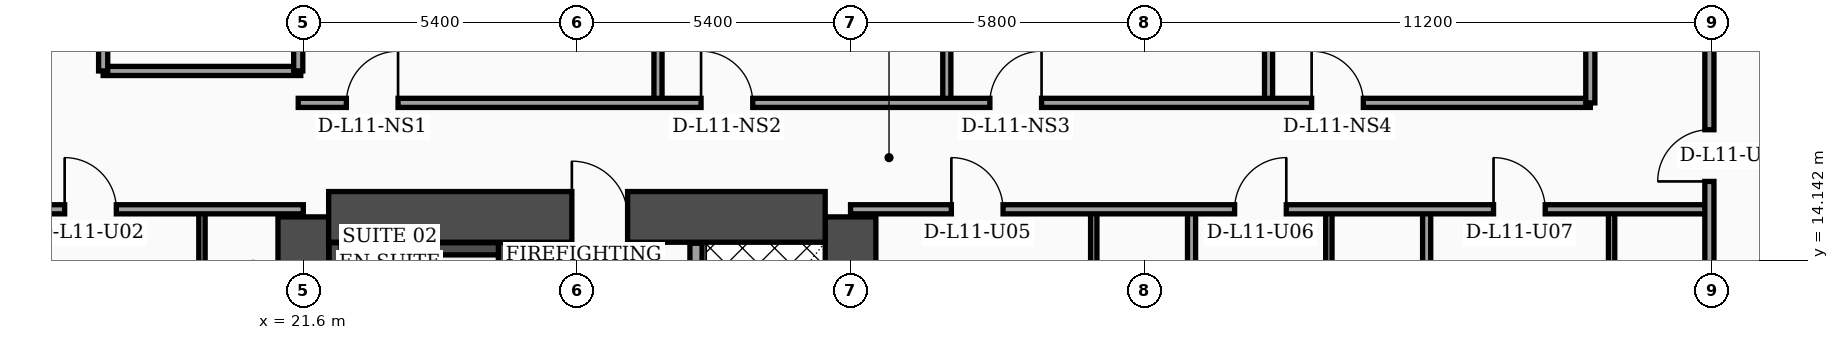
"""IFC4 building model, lengths in metres.
Left out: names, types, materials, properties, quantities, classifications, styles, units other than length and angle.
Written with IfcOpenShell. Run it as: python <this file> out.ifc"""

import sys

from ifc_helpers import new_model, si_unit, direction, frame, frame_2d, origin, place, context, subcontext, project, spatial, rectangle, extrude, element, fill, save


model = new_model("IFC4")
c1 = context("Model", 3, precision=1e-05, world=origin(), true_north=direction((0.0, 1.0)))
c2 = subcontext(c1, "Body", "Model", "MODEL_VIEW")
j1 = project(units=[si_unit("LENGTHUNIT", "METRE"), si_unit("PLANEANGLEUNIT", "RADIAN")], contexts=[c1])
p1 = place(None, origin())
s1 = spatial("IfcSite", under=j1, at=p1, CompositionType="ELEMENT")
p2 = place(p1, origin())
s2 = spatial("IfcBuilding", under=s1, at=p2, CompositionType="ELEMENT")
p3 = place(p2, frame((0.0, 0.0, 50.8)))
s3 = spatial("IfcBuildingStorey", under=s2, at=p3, CompositionType="ELEMENT", Elevation=50.8)
for number, where, z_axis, x_axis in (
    (1, (21.6, 4.6, 0.0), (0.0, 0.0, 1.0), (0.0, 1.0, 0.0)),
    (2, (32.4, 4.6, 0.0), (0.0, 0.0, 1.0), (0.0, 1.0, 0.0)),
):
    element("IfcWall", number, at=place(p3, frame(where, z_axis=z_axis, x_axis=x_axis)), inside=s3, PredefinedType="SHEAR", context=c2, shape_type="SweptSolid", body=[
        extrude(rectangle(XDim=10.4, YDim=1.0, at=frame_2d((5.2, 0.0))), origin(), (0.0, 0.0, 1.0), 3.56),
    ])
p4 = place(p3, frame((22.1, 15.0, 0.0), z_axis=(0.0, 0.0, 1.0), x_axis=(1.0, 0.0, 0.0)))
e3 = element("IfcWall", 3, at=p4, inside=s3, PredefinedType="SHEAR", context=c2, shape_type="SweptSolid", body=[
    extrude(rectangle(XDim=9.8, YDim=1.0, at=frame_2d((4.9, 0.0))), origin(), (0.0, 0.0, 1.0), 3.56),
])
p5 = place(p4, frame((4.8, 0.0, 0.0)))
e4 = element("IfcOpeningElement", 4, at=p5, cuts=e3, PredefinedType="OPENING", context=c2, shape_type="SweptSolid", body=[
    extrude(rectangle(XDim=1.1, YDim=2.2, at=frame_2d((0.55, 1.1))), frame((0.0, 0.51, 0.0), z_axis=(0.0, -1.0, 0.0), x_axis=(1.0, 0.0, 0.0)), (0.0, 0.0, 1.0), 1.02),
])
p6 = place(p3, frame((22.23, 5.1, 0.0), z_axis=(0.0, 0.0, 1.0), x_axis=(0.0, 1.0, 0.0)))
e5 = element("IfcWall", 5, at=p6, inside=s3, PredefinedType="SOLIDWALL", context=c2, shape_type="SweptSolid", body=[
    extrude(rectangle(XDim=9.39, YDim=0.24, at=frame_2d((4.695, 0.0))), origin(), (0.0, 0.0, 1.0), 3.56),
])
p7 = place(p3, frame((25.57, 5.1, 0.0), z_axis=(0.0, 0.0, 1.0), x_axis=(0.0, 1.0, 0.0)))
e6 = element("IfcWall", 6, at=p7, inside=s3, PredefinedType="SOLIDWALL", context=c2, shape_type="SweptSolid", body=[
    extrude(rectangle(XDim=9.39, YDim=0.24, at=frame_2d((4.695, 0.0))), origin(), (0.0, 0.0, 1.0), 3.56),
])
p8 = place(p7, frame((0.35, 0.0, 0.0)))
e7 = element("IfcOpeningElement", 7, at=p8, cuts=e6, PredefinedType="OPENING", context=c2, shape_type="SweptSolid", body=[
    extrude(rectangle(XDim=1.15, YDim=2.2, at=frame_2d((0.575, 1.1))), frame((0.0, 0.13, 0.0), z_axis=(0.0, -1.0, 0.0), x_axis=(1.0, 0.0, 0.0)), (0.0, 0.0, 1.0), 0.26),
])
p9 = place(p3, frame((22.35, 14.37, 0.0), z_axis=(0.0, 0.0, 1.0), x_axis=(1.0, 0.0, 0.0)))
e8 = element("IfcWall", 8, at=p9, inside=s3, PredefinedType="SOLIDWALL", context=c2, shape_type="SweptSolid", body=[
    extrude(rectangle(XDim=3.1, YDim=0.24, at=frame_2d((1.55, 0.0))), origin(), (0.0, 0.0, 1.0), 3.56),
])
p10 = place(p3, frame((29.35, 5.12, 0.0), z_axis=(0.0, 0.0, 1.0), x_axis=(0.0, 1.0, 0.0)))
e9 = element("IfcWall", 9, at=p10, inside=s3, PredefinedType="SOLIDWALL", context=c2, shape_type="SweptSolid", body=[
    extrude(rectangle(XDim=9.36, YDim=0.24, at=frame_2d((4.68, 0.0))), origin(), (0.0, 0.0, 1.0), 3.56),
])
p11 = place(p10, frame((0.55, 0.0, 0.0)))
e10 = element("IfcOpeningElement", 10, at=p11, cuts=e9, PredefinedType="OPENING", context=c2, shape_type="SweptSolid", body=[
    extrude(rectangle(XDim=1.3, YDim=2.35, at=frame_2d((0.65, 1.175))), frame((0.0, 0.13, 0.0), z_axis=(0.0, -1.0, 0.0), x_axis=(1.0, 0.0, 0.0)), (0.0, 0.0, 1.0), 0.26),
])
p12 = place(p3, frame((19.6, 2.44, 0.0), z_axis=(0.0, 0.0, 1.0), x_axis=(0.0, 1.0, 0.0)))
e11 = element("IfcWall", 11, at=p12, inside=s3, PredefinedType="PARTITIONING", context=c2, shape_type="SweptSolid", body=[
    extrude(rectangle(XDim=12.71, YDim=0.125, at=frame_2d((6.355, 0.0))), origin(), (0.0, 0.0, 1.0), 2.34),
])
p13 = place(p12, frame((4.34, 0.0, 0.0)))
e12 = element("IfcOpeningElement", 12, at=p13, cuts=e11, PredefinedType="OPENING", context=c2, shape_type="SweptSolid", body=[
    extrude(rectangle(XDim=0.96, YDim=2.2, at=frame_2d((0.48, 1.1))), frame((0.0, 0.073, 0.0), z_axis=(0.0, -1.0, 0.0), x_axis=(1.0, 0.0, 0.0)), (0.0, 0.0, 1.0), 0.145),
])
p14 = place(p12, frame((10.18, 0.0, 0.0)))
e13 = element("IfcOpeningElement", 13, at=p14, cuts=e11, PredefinedType="OPENING", context=c2, shape_type="SweptSolid", body=[
    extrude(rectangle(XDim=0.9, YDim=2.15, at=frame_2d((0.45, 1.075))), frame((0.0, 0.073, 0.0), z_axis=(0.0, -1.0, 0.0), x_axis=(1.0, 0.0, 0.0)), (0.0, 0.0, 1.0), 0.145),
])
p15 = place(p3, frame((15.15, 15.15, 0.0), z_axis=(0.0, 0.0, 1.0), x_axis=(1.0, 0.0, 0.0)))
e14 = element("IfcWall", 14, at=p15, inside=s3, PredefinedType="PARTITIONING", context=c2, shape_type="SweptSolid", body=[
    extrude(rectangle(XDim=6.45, YDim=0.18, at=frame_2d((3.225, 0.0))), origin(), (0.0, 0.0, 1.0), 2.34),
])
p16 = place(p15, frame((1.74, 0.0, 0.0)))
e15 = element("IfcOpeningElement", 15, at=p16, cuts=e14, PredefinedType="OPENING", context=c2, shape_type="SweptSolid", body=[
    extrude(rectangle(XDim=1.02, YDim=2.2, at=frame_2d((0.51, 1.1))), frame((0.0, 0.1, 0.0), z_axis=(0.0, -1.0, 0.0), x_axis=(1.0, 0.0, 0.0)), (0.0, 0.0, 1.0), 0.2),
])
p17 = place(p3, frame((17.65, 17.88, 0.0), z_axis=(0.0, 0.0, 1.0), x_axis=(1.0, 0.0, 0.0)))
e16 = element("IfcWall", 16, at=p17, inside=s3, PredefinedType="PARTITIONING", context=c2, shape_type="SweptSolid", body=[
    extrude(rectangle(XDim=3.9, YDim=0.18, at=frame_2d((1.95, 0.0))), origin(), (0.0, 0.0, 1.0), 3.56),
])
p18 = place(p3, frame((21.5, 17.88, 0.0), z_axis=(0.0, 0.0, 1.0), x_axis=(0.0, 1.0, 0.0)))
e17 = element("IfcWall", 17, at=p18, inside=s3, PredefinedType="PARTITIONING", context=c2, shape_type="SweptSolid", body=[
    extrude(rectangle(XDim=6.44, YDim=0.18, at=frame_2d((3.22, 0.0))), origin(), (0.0, 0.0, 1.0), 3.56),
])
p19 = place(p3, frame((17.65, 17.88, 0.0), z_axis=(0.0, 0.0, 1.0), x_axis=(0.0, 1.0, 0.0)))
e18 = element("IfcWall", 18, at=p19, inside=s3, PredefinedType="PARTITIONING", context=c2, shape_type="SweptSolid", body=[
    extrude(rectangle(XDim=6.44, YDim=0.18, at=frame_2d((3.22, 0.0))), origin(), (0.0, 0.0, 1.0), 3.56),
])
p20 = place(p19, frame((0.65, 0.0, 0.0)))
e19 = element("IfcOpeningElement", 19, at=p20, cuts=e18, PredefinedType="OPENING", context=c2, shape_type="SweptSolid", body=[
    extrude(rectangle(XDim=0.98, YDim=2.15, at=frame_2d((0.49, 1.075))), frame((0.0, 0.1, 0.0), z_axis=(0.0, -1.0, 0.0), x_axis=(1.0, 0.0, 0.0)), (0.0, 0.0, 1.0), 0.2),
])
p21 = place(p19, frame((3.97, 0.0, 0.0)))
e20 = element("IfcOpeningElement", 20, at=p21, cuts=e18, PredefinedType="OPENING", context=c2, shape_type="SweptSolid", body=[
    extrude(rectangle(XDim=0.96, YDim=2.2, at=frame_2d((0.48, 1.1))), frame((0.0, 0.1, 0.0), z_axis=(0.0, -1.0, 0.0), x_axis=(1.0, 0.0, 0.0)), (0.0, 0.0, 1.0), 0.2),
])
p22 = place(p3, frame((37.2, 2.44, 0.0), z_axis=(0.0, 0.0, 1.0), x_axis=(0.0, 1.0, 0.0)))
e21 = element("IfcWall", 21, at=p22, inside=s3, PredefinedType="PARTITIONING", context=c2, shape_type="SweptSolid", body=[
    extrude(rectangle(XDim=12.71, YDim=0.125, at=frame_2d((6.355, 0.0))), origin(), (0.0, 0.0, 1.0), 2.84),
])
p23 = place(p22, frame((4.35, 0.0, 0.0)))
e22 = element("IfcOpeningElement", 22, at=p23, cuts=e21, PredefinedType="OPENING", context=c2, shape_type="SweptSolid", body=[
    extrude(rectangle(XDim=0.96, YDim=2.2, at=frame_2d((0.48, 1.1))), frame((0.0, 0.073, 0.0), z_axis=(0.0, -1.0, 0.0), x_axis=(1.0, 0.0, 0.0)), (0.0, 0.0, 1.0), 0.145),
])
p24 = place(p22, frame((10.21, 0.0, 0.0)))
e23 = element("IfcOpeningElement", 23, at=p24, cuts=e21, PredefinedType="OPENING", context=c2, shape_type="SweptSolid", body=[
    extrude(rectangle(XDim=0.9, YDim=2.15, at=frame_2d((0.45, 1.075))), frame((0.0, 0.073, 0.0), z_axis=(0.0, -1.0, 0.0), x_axis=(1.0, 0.0, 0.0)), (0.0, 0.0, 1.0), 0.145),
])
p25 = place(p3, frame((41.84, 2.44, 0.0), z_axis=(0.0, 0.0, 1.0), x_axis=(0.0, 1.0, 0.0)))
e24 = element("IfcWall", 24, at=p25, inside=s3, PredefinedType="PARTITIONING", context=c2, shape_type="SweptSolid", body=[
    extrude(rectangle(XDim=12.71, YDim=0.125, at=frame_2d((6.355, 0.0))), origin(), (0.0, 0.0, 1.0), 3.04),
])
p26 = place(p25, frame((4.35, 0.0, 0.0)))
e25 = element("IfcOpeningElement", 25, at=p26, cuts=e24, PredefinedType="OPENING", context=c2, shape_type="SweptSolid", body=[
    extrude(rectangle(XDim=0.96, YDim=2.2, at=frame_2d((0.48, 1.1))), frame((0.0, 0.073, 0.0), z_axis=(0.0, -1.0, 0.0), x_axis=(1.0, 0.0, 0.0)), (0.0, 0.0, 1.0), 0.145),
])
p27 = place(p25, frame((10.21, 0.0, 0.0)))
e26 = element("IfcOpeningElement", 26, at=p27, cuts=e24, PredefinedType="OPENING", context=c2, shape_type="SweptSolid", body=[
    extrude(rectangle(XDim=0.9, YDim=2.15, at=frame_2d((0.45, 1.075))), frame((0.0, 0.073, 0.0), z_axis=(0.0, -1.0, 0.0), x_axis=(1.0, 0.0, 0.0)), (0.0, 0.0, 1.0), 0.145),
])
p28 = place(p3, frame((39.13, 2.44, 0.0), z_axis=(0.0, 0.0, 1.0), x_axis=(0.0, 1.0, 0.0)))
e27 = element("IfcWall", 27, at=p28, inside=s3, PredefinedType="PARTITIONING", context=c2, shape_type="SweptSolid", body=[
    extrude(rectangle(XDim=12.71, YDim=0.16, at=frame_2d((6.355, 0.0))), origin(), (0.0, 0.0, 1.0), 2.84),
])
p29 = place(p3, frame((47.42, 2.44, 0.0), z_axis=(0.0, 0.0, 1.0), x_axis=(0.0, 1.0, 0.0)))
e28 = element("IfcWall", 28, at=p29, inside=s3, PredefinedType="PARTITIONING", context=c2, shape_type="SweptSolid", body=[
    extrude(rectangle(XDim=12.71, YDim=0.125, at=frame_2d((6.355, 0.0))), origin(), (0.0, 0.0, 1.0), 2.84),
])
p30 = place(p29, frame((4.35, 0.0, 0.0)))
e29 = element("IfcOpeningElement", 29, at=p30, cuts=e28, PredefinedType="OPENING", context=c2, shape_type="SweptSolid", body=[
    extrude(rectangle(XDim=0.96, YDim=2.2, at=frame_2d((0.48, 1.1))), frame((0.0, 0.073, 0.0), z_axis=(0.0, -1.0, 0.0), x_axis=(1.0, 0.0, 0.0)), (0.0, 0.0, 1.0), 0.145),
])
p31 = place(p29, frame((10.21, 0.0, 0.0)))
e30 = element("IfcOpeningElement", 30, at=p31, cuts=e28, PredefinedType="OPENING", context=c2, shape_type="SweptSolid", body=[
    extrude(rectangle(XDim=0.9, YDim=2.15, at=frame_2d((0.45, 1.075))), frame((0.0, 0.073, 0.0), z_axis=(0.0, -1.0, 0.0), x_axis=(1.0, 0.0, 0.0)), (0.0, 0.0, 1.0), 0.145),
])
p32 = place(p3, frame((43.77, 2.44, 0.0), z_axis=(0.0, 0.0, 1.0), x_axis=(0.0, 1.0, 0.0)))
e31 = element("IfcWall", 31, at=p32, inside=s3, PredefinedType="PARTITIONING", context=c2, shape_type="SweptSolid", body=[
    extrude(rectangle(XDim=12.71, YDim=0.16, at=frame_2d((6.355, 0.0))), origin(), (0.0, 0.0, 1.0), 3.04),
])
p33 = place(p3, frame((32.4, 15.15, 0.0), z_axis=(0.0, 0.0, 1.0), x_axis=(1.0, 0.0, 0.0)))
e32 = element("IfcWall", 32, at=p33, inside=s3, PredefinedType="PARTITIONING", context=c2, shape_type="SweptSolid", body=[
    extrude(rectangle(XDim=16.95, YDim=0.18, at=frame_2d((8.475, 0.0))), origin(), (0.0, 0.0, 1.0), 2.84),
])
p34 = place(p33, frame((1.99, 0.0, 0.0)))
e33 = element("IfcOpeningElement", 33, at=p34, cuts=e32, PredefinedType="OPENING", context=c2, shape_type="SweptSolid", body=[
    extrude(rectangle(XDim=1.02, YDim=2.2, at=frame_2d((0.51, 1.1))), frame((0.0, 0.1, 0.0), z_axis=(0.0, -1.0, 0.0), x_axis=(1.0, 0.0, 0.0)), (0.0, 0.0, 1.0), 0.2),
])
p35 = place(p33, frame((7.58, 0.0, 0.0)))
e34 = element("IfcOpeningElement", 34, at=p35, cuts=e32, PredefinedType="OPENING", context=c2, shape_type="SweptSolid", body=[
    extrude(rectangle(XDim=1.02, YDim=2.2, at=frame_2d((0.51, 1.1))), frame((0.0, 0.1, 0.0), z_axis=(0.0, -1.0, 0.0), x_axis=(1.0, 0.0, 0.0)), (0.0, 0.0, 1.0), 0.2),
])
p36 = place(p33, frame((12.69, 0.0, 0.0)))
e35 = element("IfcOpeningElement", 35, at=p36, cuts=e32, PredefinedType="OPENING", context=c2, shape_type="SweptSolid", body=[
    extrude(rectangle(XDim=1.02, YDim=2.2, at=frame_2d((0.51, 1.1))), frame((0.0, 0.1, 0.0), z_axis=(0.0, -1.0, 0.0), x_axis=(1.0, 0.0, 0.0)), (0.0, 0.0, 1.0), 0.2),
])
p37 = place(p3, frame((28.6, 17.25, 0.0), z_axis=(0.0, 0.0, 1.0), x_axis=(0.0, 1.0, 0.0)))
e36 = element("IfcWall", 36, at=p37, inside=s3, PredefinedType="PARTITIONING", context=c2, shape_type="SweptSolid", body=[
    extrude(rectangle(XDim=10.54, YDim=0.16, at=frame_2d((5.27, 0.0))), origin(), (0.0, 0.0, 1.0), 2.84),
])
p38 = place(p3, frame((34.3, 17.25, 0.0), z_axis=(0.0, 0.0, 1.0), x_axis=(0.0, 1.0, 0.0)))
e37 = element("IfcWall", 37, at=p38, inside=s3, PredefinedType="PARTITIONING", context=c2, shape_type="SweptSolid", body=[
    extrude(rectangle(XDim=13.23, YDim=0.16, at=frame_2d((6.615, 0.0))), origin(), (0.0, 0.0, 1.0), 2.84),
])
p39 = place(p3, frame((40.65, 17.25, 0.0), z_axis=(0.0, 0.0, 1.0), x_axis=(0.0, 1.0, 0.0)))
e38 = element("IfcWall", 38, at=p39, inside=s3, PredefinedType="PARTITIONING", context=c2, shape_type="SweptSolid", body=[
    extrude(rectangle(XDim=16.23, YDim=0.16, at=frame_2d((8.115, 0.0))), origin(), (0.0, 0.0, 1.0), 2.84),
])
p40 = place(p3, frame((21.5, 17.25, 0.0), z_axis=(0.0, 0.0, 1.0), x_axis=(1.0, 0.0, 0.0)))
e39 = element("IfcWall", 39, at=p40, inside=s3, PredefinedType="PARTITIONING", context=c2, shape_type="SweptSolid", body=[
    extrude(rectangle(XDim=25.5, YDim=0.18, at=frame_2d((12.75, 0.0))), origin(), (0.0, 0.0, 1.0), 2.84),
])
p41 = place(p40, frame((0.95, 0.0, 0.0)))
e40 = element("IfcOpeningElement", 40, at=p41, cuts=e39, PredefinedType="OPENING", context=c2, shape_type="SweptSolid", body=[
    extrude(rectangle(XDim=1.02, YDim=2.2, at=frame_2d((0.51, 1.1))), frame((0.0, 0.1, 0.0), z_axis=(0.0, -1.0, 0.0), x_axis=(1.0, 0.0, 0.0)), (0.0, 0.0, 1.0), 0.2),
])
p42 = place(p40, frame((7.95, 0.0, 0.0)))
e41 = element("IfcOpeningElement", 41, at=p42, cuts=e39, PredefinedType="OPENING", context=c2, shape_type="SweptSolid", body=[
    extrude(rectangle(XDim=1.02, YDim=2.2, at=frame_2d((0.51, 1.1))), frame((0.0, 0.1, 0.0), z_axis=(0.0, -1.0, 0.0), x_axis=(1.0, 0.0, 0.0)), (0.0, 0.0, 1.0), 0.2),
])
p43 = place(p40, frame((13.65, 0.0, 0.0)))
e42 = element("IfcOpeningElement", 42, at=p43, cuts=e39, PredefinedType="OPENING", context=c2, shape_type="SweptSolid", body=[
    extrude(rectangle(XDim=1.02, YDim=2.2, at=frame_2d((0.51, 1.1))), frame((0.0, 0.1, 0.0), z_axis=(0.0, -1.0, 0.0), x_axis=(1.0, 0.0, 0.0)), (0.0, 0.0, 1.0), 0.2),
])
p44 = place(p40, frame((20.0, 0.0, 0.0)))
e43 = element("IfcOpeningElement", 43, at=p44, cuts=e39, PredefinedType="OPENING", context=c2, shape_type="SweptSolid", body=[
    extrude(rectangle(XDim=1.02, YDim=2.2, at=frame_2d((0.51, 1.1))), frame((0.0, 0.1, 0.0), z_axis=(0.0, -1.0, 0.0), x_axis=(1.0, 0.0, 0.0)), (0.0, 0.0, 1.0), 0.2),
])
p45 = place(p3, frame((47.0, 17.25, 0.0), z_axis=(0.0, 0.0, 1.0), x_axis=(0.0, 1.0, 0.0)))
e44 = element("IfcWall", 44, at=p45, inside=s3, PredefinedType="PARTITIONING", context=c2, shape_type="SweptSolid", body=[
    extrude(rectangle(XDim=19.22, YDim=0.18, at=frame_2d((9.61, 0.0))), origin(), (0.0, 0.0, 1.0), 2.84),
])
p46 = place(p3, frame((49.35, 2.44, 0.0), z_axis=(0.0, 0.0, 1.0), x_axis=(0.0, 1.0, 0.0)))
e45 = element("IfcWall", 45, at=p46, inside=s3, PredefinedType="PARTITIONING", context=c2, shape_type="SweptSolid", body=[
    extrude(rectangle(XDim=27.84, YDim=0.18, at=frame_2d((13.92, 0.0))), origin(), (0.0, 0.0, 1.0), 2.84),
])
p47 = place(p46, frame((13.26, 0.0, 0.0)))
e46 = element("IfcOpeningElement", 46, at=p47, cuts=e45, PredefinedType="OPENING", context=c2, shape_type="SweptSolid", body=[
    extrude(rectangle(XDim=1.02, YDim=2.2, at=frame_2d((0.51, 1.1))), frame((0.0, 0.1, 0.0), z_axis=(0.0, -1.0, 0.0), x_axis=(1.0, 0.0, 0.0)), (0.0, 0.0, 1.0), 0.2),
])
p48 = place(p46, frame((21.52, 0.0, 0.0)))
e47 = element("IfcOpeningElement", 47, at=p48, cuts=e45, PredefinedType="OPENING", context=c2, shape_type="SweptSolid", body=[
    extrude(rectangle(XDim=1.02, YDim=2.2, at=frame_2d((0.51, 1.1))), frame((0.0, 0.1, 0.0), z_axis=(0.0, -1.0, 0.0), x_axis=(1.0, 0.0, 0.0)), (0.0, 0.0, 1.0), 0.2),
])
p49 = place(p16, origin())
e48 = element("IfcDoor", 48, at=p49, inside=s3, OperationType="SINGLE_SWING_LEFT", PredefinedType="DOOR", context=c2, shape_type="SweptSolid", body=[
    extrude(rectangle(XDim=1.02, YDim=2.2, at=frame_2d((0.51, 1.1))), frame((0.0, 0.025, 0.0), z_axis=(0.0, -1.0, 0.0), x_axis=(1.0, 0.0, 0.0)), (0.0, 0.0, 1.0), 0.05),
])
fill(e15, e48)
p50 = place(p34, origin())
e49 = element("IfcDoor", 49, at=p50, inside=s3, OperationType="SINGLE_SWING_LEFT", PredefinedType="DOOR", context=c2, shape_type="SweptSolid", body=[
    extrude(rectangle(XDim=1.02, YDim=2.2, at=frame_2d((0.51, 1.1))), frame((0.0, 0.025, 0.0), z_axis=(0.0, -1.0, 0.0), x_axis=(1.0, 0.0, 0.0)), (0.0, 0.0, 1.0), 0.05),
])
fill(e33, e49)
p51 = place(p35, origin())
e50 = element("IfcDoor", 50, at=p51, inside=s3, OperationType="SINGLE_SWING_RIGHT", PredefinedType="DOOR", context=c2, shape_type="SweptSolid", body=[
    extrude(rectangle(XDim=1.02, YDim=2.2, at=frame_2d((0.51, 1.1))), frame((0.0, 0.025, 0.0), z_axis=(0.0, -1.0, 0.0), x_axis=(1.0, 0.0, 0.0)), (0.0, 0.0, 1.0), 0.05),
])
fill(e34, e50)
p52 = place(p36, origin())
e51 = element("IfcDoor", 51, at=p52, inside=s3, OperationType="SINGLE_SWING_LEFT", PredefinedType="DOOR", context=c2, shape_type="SweptSolid", body=[
    extrude(rectangle(XDim=1.02, YDim=2.2, at=frame_2d((0.51, 1.1))), frame((0.0, 0.025, 0.0), z_axis=(0.0, -1.0, 0.0), x_axis=(1.0, 0.0, 0.0)), (0.0, 0.0, 1.0), 0.05),
])
fill(e35, e51)
p53 = place(p41, origin())
e52 = element("IfcDoor", 52, at=p53, inside=s3, OperationType="SINGLE_SWING_RIGHT", PredefinedType="DOOR", context=c2, shape_type="SweptSolid", body=[
    extrude(rectangle(XDim=1.02, YDim=2.2, at=frame_2d((0.51, 1.1))), frame((0.0, 0.025, 0.0), z_axis=(0.0, -1.0, 0.0), x_axis=(1.0, 0.0, 0.0)), (0.0, 0.0, 1.0), 0.05),
])
fill(e40, e52)
p54 = place(p42, origin())
e53 = element("IfcDoor", 53, at=p54, inside=s3, OperationType="SINGLE_SWING_LEFT", PredefinedType="DOOR", context=c2, shape_type="SweptSolid", body=[
    extrude(rectangle(XDim=1.02, YDim=2.2, at=frame_2d((0.51, 1.1))), frame((0.0, 0.025, 0.0), z_axis=(0.0, -1.0, 0.0), x_axis=(1.0, 0.0, 0.0)), (0.0, 0.0, 1.0), 0.05),
])
fill(e41, e53)
p55 = place(p43, origin())
e54 = element("IfcDoor", 54, at=p55, inside=s3, OperationType="SINGLE_SWING_RIGHT", PredefinedType="DOOR", context=c2, shape_type="SweptSolid", body=[
    extrude(rectangle(XDim=1.02, YDim=2.2, at=frame_2d((0.51, 1.1))), frame((0.0, 0.025, 0.0), z_axis=(0.0, -1.0, 0.0), x_axis=(1.0, 0.0, 0.0)), (0.0, 0.0, 1.0), 0.05),
])
fill(e42, e54)
p56 = place(p44, origin())
e55 = element("IfcDoor", 55, at=p56, inside=s3, OperationType="SINGLE_SWING_LEFT", PredefinedType="DOOR", context=c2, shape_type="SweptSolid", body=[
    extrude(rectangle(XDim=1.02, YDim=2.2, at=frame_2d((0.51, 1.1))), frame((0.0, 0.025, 0.0), z_axis=(0.0, -1.0, 0.0), x_axis=(1.0, 0.0, 0.0)), (0.0, 0.0, 1.0), 0.05),
])
fill(e43, e55)
p57 = place(p47, origin())
e56 = element("IfcDoor", 56, at=p57, inside=s3, OperationType="SINGLE_SWING_LEFT", PredefinedType="DOOR", context=c2, shape_type="SweptSolid", body=[
    extrude(rectangle(XDim=1.02, YDim=2.2, at=frame_2d((0.51, 1.1))), frame((0.0, 0.025, 0.0), z_axis=(0.0, -1.0, 0.0), x_axis=(1.0, 0.0, 0.0)), (0.0, 0.0, 1.0), 0.05),
])
fill(e46, e56)
p58 = place(p5, origin())
e57 = element("IfcDoor", 57, at=p58, inside=s3, OperationType="SINGLE_SWING_LEFT", PredefinedType="DOOR", context=c2, shape_type="SweptSolid", body=[
    extrude(rectangle(XDim=1.1, YDim=2.2, at=frame_2d((0.55, 1.1))), frame((0.0, 0.025, 0.0), z_axis=(0.0, -1.0, 0.0), x_axis=(1.0, 0.0, 0.0)), (0.0, 0.0, 1.0), 0.05),
])
fill(e4, e57)
save(model, sys.argv[1])
